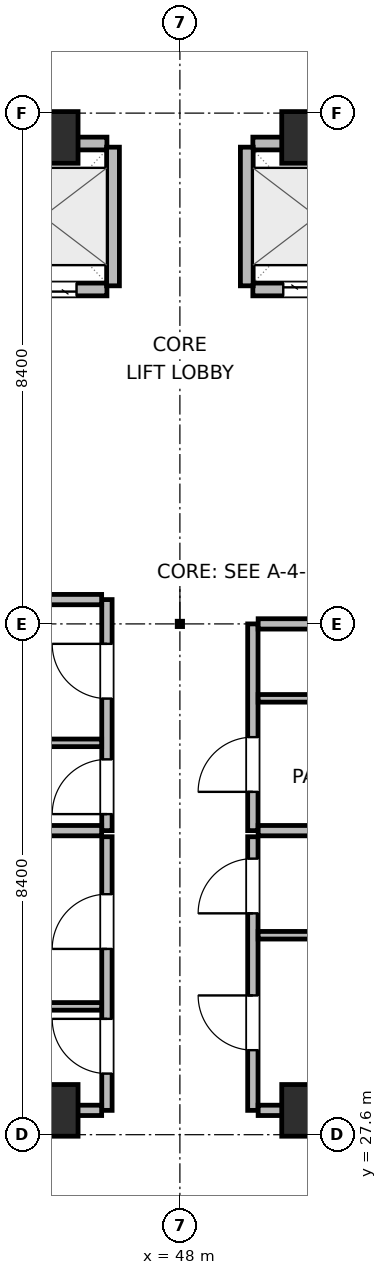
"""IFC4 building model, lengths in metres.
Left out: names, types, materials, properties, quantities, classifications, styles, units other than length and angle.
Written with IfcOpenShell. Run it as: python <this file> out.ifc"""

import sys

from ifc_helpers import new_model, si_unit, direction, frame, frame_2d, origin, origin_2d, place, context, subcontext, project, spatial, rectangle, extrude, element, fill, save


model = new_model("IFC4")
c1 = context("Model", 3, precision=1e-05, world=origin(), true_north=direction((0.0, 1.0)))
c2 = subcontext(c1, "Body", "Model", "MODEL_VIEW")
j1 = project(units=[si_unit("LENGTHUNIT", "METRE"), si_unit("PLANEANGLEUNIT", "RADIAN")], contexts=[c1])
p1 = place(None, origin())
s1 = spatial("IfcSite", under=j1, at=p1, CompositionType="ELEMENT")
p2 = place(p1, origin())
s2 = spatial("IfcBuilding", under=s1, at=p2, CompositionType="ELEMENT")
p3 = place(p2, frame((0.0, 0.0, 162.3)))
s3 = spatial("IfcBuildingStorey", under=s2, at=p3, CompositionType="ELEMENT", Elevation=162.3)
for number, where, z_axis, x_axis in (
    (1, (45.9, 28.0, 0.0), (0.0, 0.0, 1.0), (1.0, 0.0, 0.0)),
    (2, (50.1, 28.0, 0.0), (0.0, 0.0, 1.0), (1.0, 0.0, 0.0)),
    (3, (45.9, 44.0, 0.0), (0.0, 0.0, 1.0), (1.0, 0.0, 0.0)),
    (4, (50.1, 44.0, 0.0), (0.0, 0.0, 1.0), (1.0, 0.0, 0.0)),
):
    element("IfcColumn", number, at=place(p3, frame(where, z_axis=z_axis, x_axis=x_axis)), inside=s3, PredefinedType="COLUMN", context=c2, shape_type="SweptSolid", body=[
        extrude(rectangle(XDim=0.85, YDim=0.85, at=origin_2d()), origin(), (0.0, 0.0, 1.0), 3.9),
    ])
p4 = place(p3, frame((44.7, 41.5, 0.0), z_axis=(0.0, 0.0, 1.0), x_axis=(1.0, 0.0, 0.0)))
e5 = element("IfcWall", 5, at=p4, inside=s3, PredefinedType="PARTITIONING", context=c2, shape_type="SweptSolid", body=[
    extrude(rectangle(XDim=2.1, YDim=0.21, at=frame_2d((1.05, 0.0))), origin(), (0.0, 0.0, 1.0), 3.68),
])
p5 = place(p4, frame((0.5, 0.0, 0.0)))
e6 = element("IfcOpeningElement", 6, at=p5, cuts=e5, PredefinedType="OPENING", context=c2, shape_type="SweptSolid", body=[
    extrude(rectangle(XDim=1.1, YDim=2.04, at=frame_2d((0.55, 1.02))), frame((0.0, 0.115, 0.0), z_axis=(0.0, -1.0, 0.0), x_axis=(1.0, 0.0, 0.0)), (0.0, 0.0, 1.0), 0.23),
])
p6 = place(p3, frame((44.7, 43.9, 0.0), z_axis=(0.0, 0.0, 1.0), x_axis=(1.0, 0.0, 0.0)))
e7 = element("IfcWall", 7, at=p6, inside=s3, PredefinedType="PARTITIONING", context=c2, shape_type="SweptSolid", body=[
    extrude(rectangle(XDim=2.1, YDim=0.21, at=frame_2d((1.05, 0.0))), origin(), (0.0, 0.0, 1.0), 2.765),
])
p7 = place(p3, frame((46.9, 41.56, 0.0), z_axis=(0.0, 0.0, 1.0), x_axis=(0.0, 1.0, 0.0)))
e8 = element("IfcWall", 8, at=p7, inside=s3, PredefinedType="PARTITIONING", context=c2, shape_type="SweptSolid", body=[
    extrude(rectangle(XDim=2.28, YDim=0.21, at=frame_2d((1.14, 0.0))), origin(), (0.0, 0.0, 1.0), 3.68),
])
p8 = place(p3, frame((49.2, 41.5, 0.0), z_axis=(0.0, 0.0, 1.0), x_axis=(1.0, 0.0, 0.0)))
e9 = element("IfcWall", 9, at=p8, inside=s3, PredefinedType="PARTITIONING", context=c2, shape_type="SweptSolid", body=[
    extrude(rectangle(XDim=2.1, YDim=0.21, at=frame_2d((1.05, 0.0))), origin(), (0.0, 0.0, 1.0), 3.68),
])
p9 = place(p8, frame((0.5, 0.0, 0.0)))
e10 = element("IfcOpeningElement", 10, at=p9, cuts=e9, PredefinedType="OPENING", context=c2, shape_type="SweptSolid", body=[
    extrude(rectangle(XDim=1.1, YDim=2.04, at=frame_2d((0.55, 1.02))), frame((0.0, 0.115, 0.0), z_axis=(0.0, -1.0, 0.0), x_axis=(1.0, 0.0, 0.0)), (0.0, 0.0, 1.0), 0.23),
])
p10 = place(p3, frame((49.2, 43.9, 0.0), z_axis=(0.0, 0.0, 1.0), x_axis=(1.0, 0.0, 0.0)))
e11 = element("IfcWall", 11, at=p10, inside=s3, PredefinedType="PARTITIONING", context=c2, shape_type="SweptSolid", body=[
    extrude(rectangle(XDim=2.1, YDim=0.21, at=frame_2d((1.05, 0.0))), origin(), (0.0, 0.0, 1.0), 2.765),
])
p11 = place(p3, frame((49.1, 41.56, 0.0), z_axis=(0.0, 0.0, 1.0), x_axis=(0.0, 1.0, 0.0)))
e12 = element("IfcWall", 12, at=p11, inside=s3, PredefinedType="PARTITIONING", context=c2, shape_type="SweptSolid", body=[
    extrude(rectangle(XDim=2.28, YDim=0.21, at=frame_2d((1.14, 0.0))), origin(), (0.0, 0.0, 1.0), 3.68),
])
p12 = place(p3, frame((46.8, 32.6, 0.0), z_axis=(0.0, 0.0, 1.0), x_axis=(0.0, 1.0, 0.0)))
e13 = element("IfcWall", 13, at=p12, inside=s3, PredefinedType="PARTITIONING", context=c2, shape_type="SweptSolid", body=[
    extrude(rectangle(XDim=3.8, YDim=0.17, at=frame_2d((1.9, 0.0))), origin(), (0.0, 0.0, 1.0), 3.68),
])
p13 = place(p12, frame((0.272, 0.0, 0.0)))
e14 = element("IfcOpeningElement", 14, at=p13, cuts=e13, PredefinedType="OPENING", context=c2, shape_type="SweptSolid", body=[
    extrude(rectangle(XDim=0.9, YDim=2.02, at=frame_2d((0.45, 1.01))), frame((0.0, 0.095, 0.0), z_axis=(0.0, -1.0, 0.0), x_axis=(1.0, 0.0, 0.0)), (0.0, 0.0, 1.0), 0.19),
])
p14 = place(p12, frame((2.172, 0.0, 0.0)))
e15 = element("IfcOpeningElement", 15, at=p14, cuts=e13, PredefinedType="OPENING", context=c2, shape_type="SweptSolid", body=[
    extrude(rectangle(XDim=0.9, YDim=2.02, at=frame_2d((0.45, 1.01))), frame((0.0, 0.095, 0.0), z_axis=(0.0, -1.0, 0.0), x_axis=(1.0, 0.0, 0.0)), (0.0, 0.0, 1.0), 0.19),
])
for number, where, z_axis, x_axis in (
    (16, (43.8, 32.6, 0.0), (0.0, 0.0, 1.0), (1.0, 0.0, 0.0)),
    (17, (43.8, 36.4, 0.0), (0.0, 0.0, 1.0), (1.0, 0.0, 0.0)),
):
    element("IfcWall", number, at=place(p3, frame(where, z_axis=z_axis, x_axis=x_axis)), inside=s3, PredefinedType="PARTITIONING", context=c2, shape_type="SweptSolid", body=[
        extrude(rectangle(XDim=2.913, YDim=0.17, at=frame_2d((1.457, 0.0))), origin(), (0.0, 0.0, 1.0), 3.68),
    ])
p15 = place(p3, frame((43.8, 34.044, 0.0), z_axis=(0.0, 0.0, 1.0), x_axis=(1.0, 0.0, 0.0)))
e18 = element("IfcWall", 18, at=p15, inside=s3, PredefinedType="PARTITIONING", context=c2, shape_type="SweptSolid", body=[
    extrude(rectangle(XDim=2.913, YDim=0.125, at=frame_2d((1.457, 0.0))), origin(), (0.0, 0.0, 1.0), 3.68),
])
p16 = place(p3, frame((49.2, 32.6, 0.0), z_axis=(0.0, 0.0, 1.0), x_axis=(0.0, 1.0, 0.0)))
e19 = element("IfcWall", 19, at=p16, inside=s3, PredefinedType="PARTITIONING", context=c2, shape_type="SweptSolid", body=[
    extrude(rectangle(XDim=3.4, YDim=0.17, at=frame_2d((1.7, 0.0))), origin(), (0.0, 0.0, 1.0), 3.68),
])
p17 = place(p16, frame((0.638, 0.0, 0.0)))
e20 = element("IfcOpeningElement", 20, at=p17, cuts=e19, PredefinedType="OPENING", context=c2, shape_type="SweptSolid", body=[
    extrude(rectangle(XDim=0.9, YDim=2.02, at=frame_2d((0.45, 1.01))), frame((0.0, 0.095, 0.0), z_axis=(0.0, -1.0, 0.0), x_axis=(1.0, 0.0, 0.0)), (0.0, 0.0, 1.0), 0.19),
])
for number, where, z_axis, x_axis in (
    (21, (49.287, 32.6, 0.0), (0.0, 0.0, 1.0), (1.0, 0.0, 0.0)),
    (22, (49.287, 36.0, 0.0), (0.0, 0.0, 1.0), (1.0, 0.0, 0.0)),
):
    element("IfcWall", number, at=place(p3, frame(where, z_axis=z_axis, x_axis=x_axis)), inside=s3, PredefinedType="PARTITIONING", context=c2, shape_type="SweptSolid", body=[
        extrude(rectangle(XDim=2.913, YDim=0.17, at=frame_2d((1.457, 0.0))), origin(), (0.0, 0.0, 1.0), 3.68),
    ])
p18 = place(p3, frame((49.287, 34.776, 0.0), z_axis=(0.0, 0.0, 1.0), x_axis=(1.0, 0.0, 0.0)))
e23 = element("IfcWall", 23, at=p18, inside=s3, PredefinedType="PARTITIONING", context=c2, shape_type="SweptSolid", body=[
    extrude(rectangle(XDim=2.913, YDim=0.125, at=frame_2d((1.457, 0.0))), origin(), (0.0, 0.0, 1.0), 3.68),
])
p19 = place(p3, frame((46.8, 28.0, 0.0), z_axis=(0.0, 0.0, 1.0), x_axis=(0.0, 1.0, 0.0)))
e24 = element("IfcWall", 24, at=p19, inside=s3, PredefinedType="PARTITIONING", context=c2, shape_type="SweptSolid", body=[
    extrude(rectangle(XDim=4.5, YDim=0.17, at=frame_2d((2.25, 0.0))), origin(), (0.0, 0.0, 1.0), 3.68),
])
p20 = place(p19, frame((0.605, 0.0, 0.0)))
e25 = element("IfcOpeningElement", 25, at=p20, cuts=e24, PredefinedType="OPENING", context=c2, shape_type="SweptSolid", body=[
    extrude(rectangle(XDim=0.9, YDim=2.02, at=frame_2d((0.45, 1.01))), frame((0.0, 0.095, 0.0), z_axis=(0.0, -1.0, 0.0), x_axis=(1.0, 0.0, 0.0)), (0.0, 0.0, 1.0), 0.19),
])
p21 = place(p19, frame((2.655, 0.0, 0.0)))
e26 = element("IfcOpeningElement", 26, at=p21, cuts=e24, PredefinedType="OPENING", context=c2, shape_type="SweptSolid", body=[
    extrude(rectangle(XDim=0.9, YDim=2.02, at=frame_2d((0.45, 1.01))), frame((0.0, 0.095, 0.0), z_axis=(0.0, -1.0, 0.0), x_axis=(1.0, 0.0, 0.0)), (0.0, 0.0, 1.0), 0.19),
])
p22 = place(p3, frame((42.5, 28.0, 0.0), z_axis=(0.0, 0.0, 1.0), x_axis=(1.0, 0.0, 0.0)))
e27 = element("IfcWall", 27, at=p22, inside=s3, PredefinedType="PARTITIONING", context=c2, shape_type="SweptSolid", body=[
    extrude(rectangle(XDim=4.213, YDim=0.17, at=frame_2d((2.106, 0.0))), origin(), (0.0, 0.0, 1.0), 2.765),
])
p23 = place(p3, frame((42.5, 29.71, 0.0), z_axis=(0.0, 0.0, 1.0), x_axis=(1.0, 0.0, 0.0)))
e28 = element("IfcWall", 28, at=p23, inside=s3, PredefinedType="PARTITIONING", context=c2, shape_type="SweptSolid", body=[
    extrude(rectangle(XDim=4.213, YDim=0.125, at=frame_2d((2.106, 0.0))), origin(), (0.0, 0.0, 1.0), 3.68),
])
p24 = place(p3, frame((49.2, 28.0, 0.0), z_axis=(0.0, 0.0, 1.0), x_axis=(0.0, 1.0, 0.0)))
e29 = element("IfcWall", 29, at=p24, inside=s3, PredefinedType="PARTITIONING", context=c2, shape_type="SweptSolid", body=[
    extrude(rectangle(XDim=4.5, YDim=0.17, at=frame_2d((2.25, 0.0))), origin(), (0.0, 0.0, 1.0), 3.68),
])
p25 = place(p24, frame((0.99, 0.0, 0.0)))
e30 = element("IfcOpeningElement", 30, at=p25, cuts=e29, PredefinedType="OPENING", context=c2, shape_type="SweptSolid", body=[
    extrude(rectangle(XDim=0.9, YDim=2.02, at=frame_2d((0.45, 1.01))), frame((0.0, 0.095, 0.0), z_axis=(0.0, -1.0, 0.0), x_axis=(1.0, 0.0, 0.0)), (0.0, 0.0, 1.0), 0.19),
])
p26 = place(p24, frame((3.24, 0.0, 0.0)))
e31 = element("IfcOpeningElement", 31, at=p26, cuts=e29, PredefinedType="OPENING", context=c2, shape_type="SweptSolid", body=[
    extrude(rectangle(XDim=0.9, YDim=2.02, at=frame_2d((0.45, 1.01))), frame((0.0, 0.095, 0.0), z_axis=(0.0, -1.0, 0.0), x_axis=(1.0, 0.0, 0.0)), (0.0, 0.0, 1.0), 0.19),
])
p27 = place(p3, frame((49.287, 28.0, 0.0), z_axis=(0.0, 0.0, 1.0), x_axis=(1.0, 0.0, 0.0)))
e32 = element("IfcWall", 32, at=p27, inside=s3, PredefinedType="PARTITIONING", context=c2, shape_type="SweptSolid", body=[
    extrude(rectangle(XDim=4.213, YDim=0.17, at=frame_2d((2.106, 0.0))), origin(), (0.0, 0.0, 1.0), 2.765),
])
p28 = place(p3, frame((49.287, 30.88, 0.0), z_axis=(0.0, 0.0, 1.0), x_axis=(1.0, 0.0, 0.0)))
e33 = element("IfcWall", 33, at=p28, inside=s3, PredefinedType="PARTITIONING", context=c2, shape_type="SweptSolid", body=[
    extrude(rectangle(XDim=4.213, YDim=0.125, at=frame_2d((2.106, 0.0))), origin(), (0.0, 0.0, 1.0), 3.68),
])
p29 = place(p5, origin())
e34 = element("IfcDoor", 34, at=p29, inside=s3, OperationType="DOUBLE_DOOR_SLIDING", PredefinedType="DOOR", context=c2, shape_type="SweptSolid", body=[
    extrude(rectangle(XDim=1.1, YDim=2.04, at=frame_2d((0.55, 1.02))), frame((0.0, 0.025, 0.0), z_axis=(0.0, -1.0, 0.0), x_axis=(1.0, 0.0, 0.0)), (0.0, 0.0, 1.0), 0.05),
])
fill(e6, e34)
p30 = place(p9, origin())
e35 = element("IfcDoor", 35, at=p30, inside=s3, OperationType="DOUBLE_DOOR_SLIDING", PredefinedType="DOOR", context=c2, shape_type="SweptSolid", body=[
    extrude(rectangle(XDim=1.1, YDim=2.04, at=frame_2d((0.55, 1.02))), frame((0.0, 0.025, 0.0), z_axis=(0.0, -1.0, 0.0), x_axis=(1.0, 0.0, 0.0)), (0.0, 0.0, 1.0), 0.05),
])
fill(e10, e35)
p31 = place(p13, origin())
e36 = element("IfcDoor", 36, at=p31, inside=s3, OperationType="SINGLE_SWING_LEFT", PredefinedType="DOOR", context=c2, shape_type="SweptSolid", body=[
    extrude(rectangle(XDim=0.9, YDim=2.02, at=frame_2d((0.45, 1.01))), frame((0.0, 0.025, 0.0), z_axis=(0.0, -1.0, 0.0), x_axis=(1.0, 0.0, 0.0)), (0.0, 0.0, 1.0), 0.05),
])
fill(e14, e36)
p32 = place(p14, origin())
e37 = element("IfcDoor", 37, at=p32, inside=s3, OperationType="SINGLE_SWING_RIGHT", PredefinedType="DOOR", context=c2, shape_type="SweptSolid", body=[
    extrude(rectangle(XDim=0.9, YDim=2.02, at=frame_2d((0.45, 1.01))), frame((0.0, 0.025, 0.0), z_axis=(0.0, -1.0, 0.0), x_axis=(1.0, 0.0, 0.0)), (0.0, 0.0, 1.0), 0.05),
])
fill(e15, e37)
p33 = place(p17, origin())
e38 = element("IfcDoor", 38, at=p33, inside=s3, OperationType="SINGLE_SWING_LEFT", PredefinedType="DOOR", context=c2, shape_type="SweptSolid", body=[
    extrude(rectangle(XDim=0.9, YDim=2.02, at=frame_2d((0.45, 1.01))), frame((0.0, 0.025, 0.0), z_axis=(0.0, -1.0, 0.0), x_axis=(1.0, 0.0, 0.0)), (0.0, 0.0, 1.0), 0.05),
])
fill(e20, e38)
p34 = place(p20, origin())
e39 = element("IfcDoor", 39, at=p34, inside=s3, OperationType="SINGLE_SWING_RIGHT", PredefinedType="DOOR", context=c2, shape_type="SweptSolid", body=[
    extrude(rectangle(XDim=0.9, YDim=2.02, at=frame_2d((0.45, 1.01))), frame((0.0, 0.025, 0.0), z_axis=(0.0, -1.0, 0.0), x_axis=(1.0, 0.0, 0.0)), (0.0, 0.0, 1.0), 0.05),
])
fill(e25, e39)
p35 = place(p21, origin())
e40 = element("IfcDoor", 40, at=p35, inside=s3, OperationType="SINGLE_SWING_LEFT", PredefinedType="DOOR", context=c2, shape_type="SweptSolid", body=[
    extrude(rectangle(XDim=0.9, YDim=2.02, at=frame_2d((0.45, 1.01))), frame((0.0, 0.025, 0.0), z_axis=(0.0, -1.0, 0.0), x_axis=(1.0, 0.0, 0.0)), (0.0, 0.0, 1.0), 0.05),
])
fill(e26, e40)
p36 = place(p25, origin())
e41 = element("IfcDoor", 41, at=p36, inside=s3, OperationType="SINGLE_SWING_RIGHT", PredefinedType="DOOR", context=c2, shape_type="SweptSolid", body=[
    extrude(rectangle(XDim=0.9, YDim=2.02, at=frame_2d((0.45, 1.01))), frame((0.0, 0.025, 0.0), z_axis=(0.0, -1.0, 0.0), x_axis=(1.0, 0.0, 0.0)), (0.0, 0.0, 1.0), 0.05),
])
fill(e30, e41)
p37 = place(p26, origin())
e42 = element("IfcDoor", 42, at=p37, inside=s3, OperationType="SINGLE_SWING_LEFT", PredefinedType="DOOR", context=c2, shape_type="SweptSolid", body=[
    extrude(rectangle(XDim=0.9, YDim=2.02, at=frame_2d((0.45, 1.01))), frame((0.0, 0.025, 0.0), z_axis=(0.0, -1.0, 0.0), x_axis=(1.0, 0.0, 0.0)), (0.0, 0.0, 1.0), 0.05),
])
fill(e31, e42)
save(model, sys.argv[1])
